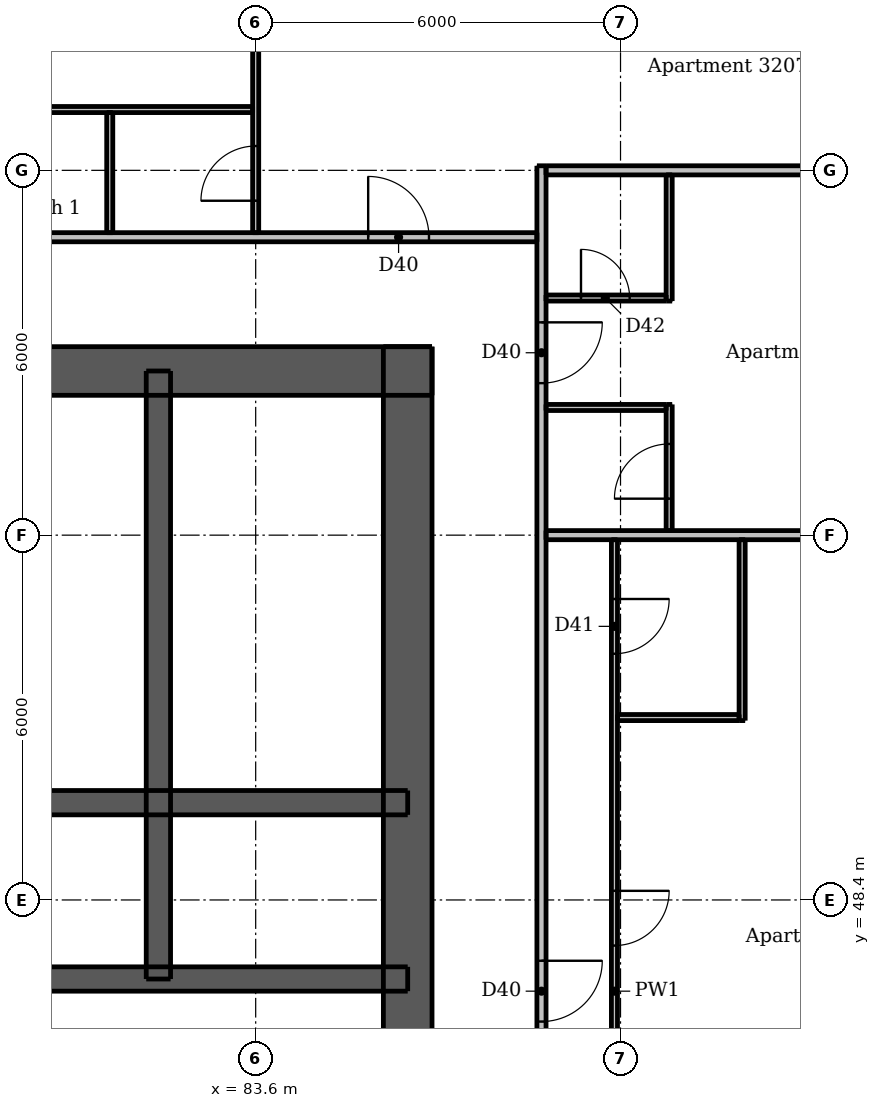
"""IFC4 building model, lengths in metres.
Left out: names, types, materials, properties, quantities, classifications, styles, units other than length and angle.
Written with IfcOpenShell. Run it as: python <this file> out.ifc"""

import sys

from ifc_helpers import new_model, si_unit, direction, frame, frame_2d, origin, place, context, subcontext, project, spatial, rectangle, extrude, element, fill, save


model = new_model("IFC4")
c1 = context("Model", 3, precision=1e-05, world=origin(), true_north=direction((0.0, 1.0)))
c2 = subcontext(c1, "Body", "Model", "MODEL_VIEW")
j1 = project(units=[si_unit("LENGTHUNIT", "METRE"), si_unit("PLANEANGLEUNIT", "RADIAN")], contexts=[c1])
p1 = place(None, origin())
s1 = spatial("IfcSite", under=j1, at=p1, CompositionType="ELEMENT")
p2 = place(p1, origin())
s2 = spatial("IfcBuilding", under=s1, at=p2, CompositionType="ELEMENT")
p3 = place(p2, frame((0.0, 0.0, 118.3)))
s3 = spatial("IfcBuildingStorey", under=s2, at=p3, CompositionType="ELEMENT", Elevation=118.3)
p4 = place(p3, frame((62.5, 57.1, 0.0), z_axis=(0.0, 0.0, 1.0), x_axis=(1.0, 0.0, 0.0)))
e1 = element("IfcWall", 1, at=p4, inside=s3, PredefinedType="SHEAR", context=c2, shape_type="SweptSolid", body=[
    extrude(rectangle(XDim=24.0, YDim=0.8, at=frame_2d((12.0, 0.0))), origin(), (0.0, 0.0, 1.0), 3.05),
])
p5 = place(p4, frame((20.9, 0.0, 0.0)))
e2 = element("IfcOpeningElement", 2, at=p5, cuts=e1, PredefinedType="OPENING", context=c2, shape_type="SweptSolid", body=[
    extrude(rectangle(XDim=1.1, YDim=2.1, at=frame_2d((0.55, 1.05))), frame((0.0, 0.41, 0.0), z_axis=(0.0, -1.0, 0.0), x_axis=(1.0, 0.0, 0.0)), (0.0, 0.0, 1.0), 0.82),
])
p6 = place(p4, frame((2.0, 0.0, 0.0)))
e3 = element("IfcOpeningElement", 3, at=p6, cuts=e1, PredefinedType="OPENING", context=c2, shape_type="SweptSolid", body=[
    extrude(rectangle(XDim=1.1, YDim=2.1, at=frame_2d((0.55, 1.05))), frame((0.0, 0.41, 0.0), z_axis=(0.0, -1.0, 0.0), x_axis=(1.0, 0.0, 0.0)), (0.0, 0.0, 1.0), 0.82),
])
p7 = place(p4, frame((6.075, 0.0, 0.0)))
e4 = element("IfcOpeningElement", 4, at=p7, cuts=e1, PredefinedType="OPENING", context=c2, shape_type="SweptSolid", body=[
    extrude(rectangle(XDim=0.9, YDim=2.1, at=frame_2d((0.45, 1.05))), frame((0.0, 0.41, 0.0), z_axis=(0.0, -1.0, 0.0), x_axis=(1.0, 0.0, 0.0)), (0.0, 0.0, 1.0), 0.82),
])
p8 = place(p4, frame((10.455, 0.0, 0.0)))
e5 = element("IfcOpeningElement", 5, at=p8, cuts=e1, PredefinedType="OPENING", context=c2, shape_type="SweptSolid", body=[
    extrude(rectangle(XDim=0.9, YDim=2.1, at=frame_2d((0.45, 1.05))), frame((0.0, 0.41, 0.0), z_axis=(0.0, -1.0, 0.0), x_axis=(1.0, 0.0, 0.0)), (0.0, 0.0, 1.0), 0.82),
])
p9 = place(p4, frame((15.93, 0.0, 0.0)))
e6 = element("IfcOpeningElement", 6, at=p9, cuts=e1, PredefinedType="OPENING", context=c2, shape_type="SweptSolid", body=[
    extrude(rectangle(XDim=0.9, YDim=2.1, at=frame_2d((0.45, 1.05))), frame((0.0, 0.41, 0.0), z_axis=(0.0, -1.0, 0.0), x_axis=(1.0, 0.0, 0.0)), (0.0, 0.0, 1.0), 0.82),
])
p10 = place(p3, frame((86.1, 33.5, 0.0), z_axis=(0.0, 0.0, 1.0), x_axis=(0.0, 1.0, 0.0)))
e7 = element("IfcWall", 7, at=p10, inside=s3, PredefinedType="SHEAR", context=c2, shape_type="SweptSolid", body=[
    extrude(rectangle(XDim=24.0, YDim=0.8, at=frame_2d((12.0, 0.0))), origin(), (0.0, 0.0, 1.0), 3.05),
])
p11 = place(p10, frame((11.2, 0.0, 0.0)))
e8 = element("IfcOpeningElement", 8, at=p11, cuts=e7, PredefinedType="OPENING", context=c2, shape_type="SweptSolid", body=[
    extrude(rectangle(XDim=1.6, YDim=2.1, at=frame_2d((0.8, 1.05))), frame((0.0, 0.41, 0.0), z_axis=(0.0, -1.0, 0.0), x_axis=(1.0, 0.0, 0.0)), (0.0, 0.0, 1.0), 0.82),
])
p12 = place(p3, frame((62.9, 47.1, 0.0), z_axis=(0.0, 0.0, 1.0), x_axis=(1.0, 0.0, 0.0)))
e9 = element("IfcWall", 9, at=p12, inside=s3, PredefinedType="SHEAR", context=c2, shape_type="SweptSolid", body=[
    extrude(rectangle(XDim=23.2, YDim=0.4, at=frame_2d((11.6, 0.0))), origin(), (0.0, 0.0, 1.0), 3.05),
])
p13 = place(p12, frame((0.825, 0.0, 0.0)))
e10 = element("IfcOpeningElement", 10, at=p13, cuts=e9, PredefinedType="OPENING", context=c2, shape_type="SweptSolid", body=[
    extrude(rectangle(XDim=0.9, YDim=2.1, at=frame_2d((0.45, 1.05))), frame((0.0, 0.21, 0.0), z_axis=(0.0, -1.0, 0.0), x_axis=(1.0, 0.0, 0.0)), (0.0, 0.0, 1.0), 0.42),
])
p14 = place(p12, frame((2.575, 0.0, 0.0)))
e11 = element("IfcOpeningElement", 11, at=p14, cuts=e9, PredefinedType="OPENING", context=c2, shape_type="SweptSolid", body=[
    extrude(rectangle(XDim=0.9, YDim=2.1, at=frame_2d((0.45, 1.05))), frame((0.0, 0.21, 0.0), z_axis=(0.0, -1.0, 0.0), x_axis=(1.0, 0.0, 0.0)), (0.0, 0.0, 1.0), 0.42),
])
p15 = place(p12, frame((20.6, 0.0, 0.0)))
e12 = element("IfcOpeningElement", 12, at=p15, cuts=e9, PredefinedType="OPENING", context=c2, shape_type="SweptSolid", body=[
    extrude(rectangle(XDim=0.9, YDim=2.1, at=frame_2d((0.45, 1.05))), frame((0.0, 0.21, 0.0), z_axis=(0.0, -1.0, 0.0), x_axis=(1.0, 0.0, 0.0)), (0.0, 0.0, 1.0), 0.42),
])
p16 = place(p3, frame((62.9, 50.0, 0.0), z_axis=(0.0, 0.0, 1.0), x_axis=(1.0, 0.0, 0.0)))
e13 = element("IfcWall", 13, at=p16, inside=s3, PredefinedType="SHEAR", context=c2, shape_type="SweptSolid", body=[
    extrude(rectangle(XDim=23.2, YDim=0.4, at=frame_2d((11.6, 0.0))), origin(), (0.0, 0.0, 1.0), 3.05),
])
p17 = place(p3, frame((82.0, 47.1, 0.0), z_axis=(0.0, 0.0, 1.0), x_axis=(0.0, 1.0, 0.0)))
e14 = element("IfcWall", 14, at=p17, inside=s3, PredefinedType="SHEAR", context=c2, shape_type="SweptSolid", body=[
    extrude(rectangle(XDim=10.0, YDim=0.4, at=frame_2d((5.0, 0.0))), origin(), (0.0, 0.0, 1.0), 3.05),
])
p18 = place(p3, frame((81.2, 59.375, 0.0), z_axis=(0.0, 0.0, 1.0), x_axis=(0.0, 1.0, 0.0)))
e15 = element("IfcWall", 15, at=p18, inside=s3, PredefinedType="PARTITIONING", context=c2, shape_type="SweptSolid", body=[
    extrude(rectangle(XDim=1.975, YDim=0.1, at=frame_2d((0.988, 0.0))), origin(), (0.0, 0.0, 1.0), 3.05),
])
p19 = place(p3, frame((83.6, 59.375, 0.0), z_axis=(0.0, 0.0, 1.0), x_axis=(0.0, 1.0, 0.0)))
e16 = element("IfcWall", 16, at=p19, inside=s3, PredefinedType="PARTITIONING", context=c2, shape_type="SweptSolid", body=[
    extrude(rectangle(XDim=8.625, YDim=0.1, at=frame_2d((4.312, 0.0))), origin(), (0.0, 0.0, 1.0), 2.516),
])
p20 = place(p19, frame((0.525, 0.0, 0.0)))
e17 = element("IfcOpeningElement", 17, at=p20, cuts=e16, PredefinedType="OPENING", context=c2, shape_type="SweptSolid", body=[
    extrude(rectangle(XDim=0.9, YDim=2.1, at=frame_2d((0.45, 1.05))), frame((0.0, 0.06, 0.0), z_axis=(0.0, -1.0, 0.0), x_axis=(1.0, 0.0, 0.0)), (0.0, 0.0, 1.0), 0.12),
])
p21 = place(p19, frame((4.875, 0.0, 0.0)))
e18 = element("IfcOpeningElement", 18, at=p21, cuts=e16, PredefinedType="OPENING", context=c2, shape_type="SweptSolid", body=[
    extrude(rectangle(XDim=0.9, YDim=2.1, at=frame_2d((0.45, 1.05))), frame((0.0, 0.06, 0.0), z_axis=(0.0, -1.0, 0.0), x_axis=(1.0, 0.0, 0.0)), (0.0, 0.0, 1.0), 0.12),
])
p22 = place(p3, frame((89.5, 54.325, 0.0), z_axis=(0.0, 0.0, 1.0), x_axis=(0.0, -1.0, 0.0)))
e19 = element("IfcWall", 19, at=p22, inside=s3, PredefinedType="PARTITIONING", context=c2, shape_type="SweptSolid", body=[
    extrude(rectangle(XDim=14.85, YDim=0.1, at=frame_2d((7.425, 0.0))), origin(), (0.0, 0.0, 1.0), 3.05),
])
p23 = place(p22, frame((5.775, 0.0, 0.0)))
e20 = element("IfcOpeningElement", 20, at=p23, cuts=e19, PredefinedType="OPENING", context=c2, shape_type="SweptSolid", body=[
    extrude(rectangle(XDim=0.9, YDim=2.1, at=frame_2d((0.45, 1.05))), frame((0.0, 0.06, 0.0), z_axis=(0.0, -1.0, 0.0), x_axis=(1.0, 0.0, 0.0)), (0.0, 0.0, 1.0), 0.12),
])
p24 = place(p22, frame((0.975, 0.0, 0.0)))
e21 = element("IfcOpeningElement", 21, at=p24, cuts=e19, PredefinedType="OPENING", context=c2, shape_type="SweptSolid", body=[
    extrude(rectangle(XDim=0.9, YDim=2.1, at=frame_2d((0.45, 1.05))), frame((0.0, 0.06, 0.0), z_axis=(0.0, -1.0, 0.0), x_axis=(1.0, 0.0, 0.0)), (0.0, 0.0, 1.0), 0.12),
])
p25 = place(p22, frame((12.975, 0.0, 0.0)))
e22 = element("IfcOpeningElement", 22, at=p25, cuts=e19, PredefinedType="OPENING", context=c2, shape_type="SweptSolid", body=[
    extrude(rectangle(XDim=0.9, YDim=2.1, at=frame_2d((0.45, 1.05))), frame((0.0, 0.06, 0.0), z_axis=(0.0, -1.0, 0.0), x_axis=(1.0, 0.0, 0.0)), (0.0, 0.0, 1.0), 0.12),
])
p26 = place(p22, frame((10.325, 0.0, 0.0)))
e23 = element("IfcOpeningElement", 23, at=p26, cuts=e19, PredefinedType="OPENING", context=c2, shape_type="SweptSolid", body=[
    extrude(rectangle(XDim=0.8, YDim=2.1, at=frame_2d((0.4, 1.05))), frame((0.0, 0.06, 0.0), z_axis=(0.0, -1.0, 0.0), x_axis=(1.0, 0.0, 0.0)), (0.0, 0.0, 1.0), 0.12),
])
p27 = place(p3, frame((90.4, 54.475, 0.0), z_axis=(0.0, 0.0, 1.0), x_axis=(0.0, 1.0, 0.0)))
e24 = element("IfcWall", 24, at=p27, inside=s3, PredefinedType="PARTITIONING", context=c2, shape_type="SweptSolid", body=[
    extrude(rectangle(XDim=2.075, YDim=0.1, at=frame_2d((1.038, 0.0))), origin(), (0.0, 0.0, 1.0), 3.05),
])
p28 = place(p27, frame((0.525, 0.0, 0.0)))
e25 = element("IfcOpeningElement", 25, at=p28, cuts=e24, PredefinedType="OPENING", context=c2, shape_type="SweptSolid", body=[
    extrude(rectangle(XDim=0.9, YDim=2.1, at=frame_2d((0.45, 1.05))), frame((0.0, 0.06, 0.0), z_axis=(0.0, -1.0, 0.0), x_axis=(1.0, 0.0, 0.0)), (0.0, 0.0, 1.0), 0.12),
])
p29 = place(p3, frame((90.4, 58.25, 0.0), z_axis=(0.0, 0.0, 1.0), x_axis=(0.0, 1.0, 0.0)))
e26 = element("IfcWall", 26, at=p29, inside=s3, PredefinedType="PARTITIONING", context=c2, shape_type="SweptSolid", body=[
    extrude(rectangle(XDim=2.075, YDim=0.1, at=frame_2d((1.038, 0.0))), origin(), (0.0, 0.0, 1.0), 3.05),
])
p30 = place(p3, frame((91.6, 51.35, 0.0), z_axis=(0.0, 0.0, 1.0), x_axis=(0.0, 1.0, 0.0)))
e27 = element("IfcWall", 27, at=p30, inside=s3, PredefinedType="PARTITIONING", context=c2, shape_type="SweptSolid", body=[
    extrude(rectangle(XDim=2.975, YDim=0.1, at=frame_2d((1.487, 0.0))), origin(), (0.0, 0.0, 1.0), 3.05),
])
p31 = place(p3, frame((83.55, 61.4, 0.0), z_axis=(0.0, 0.0, 1.0), x_axis=(-1.0, 0.0, 0.0)))
e28 = element("IfcWall", 28, at=p31, inside=s3, PredefinedType="PARTITIONING", context=c2, shape_type="SweptSolid", body=[
    extrude(rectangle(XDim=5.875, YDim=0.1, at=frame_2d((2.938, 0.0))), origin(), (0.0, 0.0, 1.0), 3.05),
])
p32 = place(p31, frame((3.75, 0.0, 0.0)))
e29 = element("IfcOpeningElement", 29, at=p32, cuts=e28, PredefinedType="OPENING", context=c2, shape_type="SweptSolid", body=[
    extrude(rectangle(XDim=0.8, YDim=2.1, at=frame_2d((0.4, 1.05))), frame((0.0, 0.06, 0.0), z_axis=(0.0, -1.0, 0.0), x_axis=(1.0, 0.0, 0.0)), (0.0, 0.0, 1.0), 0.12),
])
p33 = place(p3, frame((88.375, 58.3, 0.0), z_axis=(0.0, 0.0, 1.0), x_axis=(1.0, 0.0, 0.0)))
e30 = element("IfcWall", 30, at=p33, inside=s3, PredefinedType="PARTITIONING", context=c2, shape_type="SweptSolid", body=[
    extrude(rectangle(XDim=1.975, YDim=0.1, at=frame_2d((0.988, 0.0))), origin(), (0.0, 0.0, 1.0), 3.05),
])
p34 = place(p33, frame((0.575, 0.0, 0.0)))
e31 = element("IfcOpeningElement", 31, at=p34, cuts=e30, PredefinedType="OPENING", context=c2, shape_type="SweptSolid", body=[
    extrude(rectangle(XDim=0.8, YDim=2.1, at=frame_2d((0.4, 1.05))), frame((0.0, 0.06, 0.0), z_axis=(0.0, -1.0, 0.0), x_axis=(1.0, 0.0, 0.0)), (0.0, 0.0, 1.0), 0.12),
])
p35 = place(p3, frame((88.375, 56.5, 0.0), z_axis=(0.0, 0.0, 1.0), x_axis=(1.0, 0.0, 0.0)))
e32 = element("IfcWall", 32, at=p35, inside=s3, PredefinedType="PARTITIONING", context=c2, shape_type="SweptSolid", body=[
    extrude(rectangle(XDim=1.975, YDim=0.1, at=frame_2d((0.988, 0.0))), origin(), (0.0, 0.0, 1.0), 3.05),
])
p36 = place(p3, frame((89.55, 51.4, 0.0), z_axis=(0.0, 0.0, 1.0), x_axis=(1.0, 0.0, 0.0)))
e33 = element("IfcWall", 33, at=p36, inside=s3, PredefinedType="PARTITIONING", context=c2, shape_type="SweptSolid", body=[
    extrude(rectangle(XDim=2.0, YDim=0.1, at=frame_2d((1.0, 0.0))), origin(), (0.0, 0.0, 1.0), 3.05),
])
p37 = place(p3, frame((88.3, 60.475, 0.0), z_axis=(0.0, 0.0, 1.0), x_axis=(0.0, -1.0, 0.0)))
e34 = element("IfcWall", 34, at=p37, inside=s3, PredefinedType="PARTITIONING", context=c2, shape_type="SweptSolid", body=[
    extrude(rectangle(XDim=28.7, YDim=0.15, at=frame_2d((14.35, 0.0))), origin(), (0.0, 0.0, 1.0), 3.05),
])
p38 = place(p37, frame((27.425, 0.0, 0.0)))
e35 = element("IfcOpeningElement", 35, at=p38, cuts=e34, PredefinedType="OPENING", context=c2, shape_type="SweptSolid", body=[
    extrude(rectangle(XDim=1.0, YDim=2.1, at=frame_2d((0.5, 1.05))), frame((0.0, 0.085, 0.0), z_axis=(0.0, -1.0, 0.0), x_axis=(1.0, 0.0, 0.0)), (0.0, 0.0, 1.0), 0.17),
])
p39 = place(p37, frame((13.075, 0.0, 0.0)))
e36 = element("IfcOpeningElement", 36, at=p39, cuts=e34, PredefinedType="OPENING", context=c2, shape_type="SweptSolid", body=[
    extrude(rectangle(XDim=1.0, YDim=2.1, at=frame_2d((0.5, 1.05))), frame((0.0, 0.085, 0.0), z_axis=(0.0, -1.0, 0.0), x_axis=(1.0, 0.0, 0.0)), (0.0, 0.0, 1.0), 0.17),
])
p40 = place(p37, frame((2.575, 0.0, 0.0)))
e37 = element("IfcOpeningElement", 37, at=p40, cuts=e34, PredefinedType="OPENING", context=c2, shape_type="SweptSolid", body=[
    extrude(rectangle(XDim=1.0, YDim=2.1, at=frame_2d((0.5, 1.05))), frame((0.0, 0.085, 0.0), z_axis=(0.0, -1.0, 0.0), x_axis=(1.0, 0.0, 0.0)), (0.0, 0.0, 1.0), 0.17),
])
p41 = place(p3, frame((88.375, 60.4, 0.0), z_axis=(0.0, 0.0, 1.0), x_axis=(1.0, 0.0, 0.0)))
e38 = element("IfcWall", 38, at=p41, inside=s3, PredefinedType="PARTITIONING", context=c2, shape_type="SweptSolid", body=[
    extrude(rectangle(XDim=11.625, YDim=0.15, at=frame_2d((5.812, 0.0))), origin(), (0.0, 0.0, 1.0), 2.516),
])
p42 = place(p3, frame((59.675, 59.3, 0.0), z_axis=(0.0, 0.0, 1.0), x_axis=(1.0, 0.0, 0.0)))
e39 = element("IfcWall", 39, at=p42, inside=s3, PredefinedType="PARTITIONING", context=c2, shape_type="SweptSolid", body=[
    extrude(rectangle(XDim=28.55, YDim=0.15, at=frame_2d((14.275, 0.0))), origin(), (0.0, 0.0, 1.0), 3.05),
])
p43 = place(p42, frame((8.975, 0.0, 0.0)))
e40 = element("IfcOpeningElement", 40, at=p43, cuts=e39, PredefinedType="OPENING", context=c2, shape_type="SweptSolid", body=[
    extrude(rectangle(XDim=1.0, YDim=2.1, at=frame_2d((0.5, 1.05))), frame((0.0, 0.085, 0.0), z_axis=(0.0, -1.0, 0.0), x_axis=(1.0, 0.0, 0.0)), (0.0, 0.0, 1.0), 0.17),
])
p44 = place(p42, frame((25.775, 0.0, 0.0)))
e41 = element("IfcOpeningElement", 41, at=p44, cuts=e39, PredefinedType="OPENING", context=c2, shape_type="SweptSolid", body=[
    extrude(rectangle(XDim=1.0, YDim=2.1, at=frame_2d((0.5, 1.05))), frame((0.0, 0.085, 0.0), z_axis=(0.0, -1.0, 0.0), x_axis=(1.0, 0.0, 0.0)), (0.0, 0.0, 1.0), 0.17),
])
p45 = place(p3, frame((88.375, 54.4, 0.0), z_axis=(0.0, 0.0, 1.0), x_axis=(1.0, 0.0, 0.0)))
e42 = element("IfcWall", 42, at=p45, inside=s3, PredefinedType="PARTITIONING", context=c2, shape_type="SweptSolid", body=[
    extrude(rectangle(XDim=10.125, YDim=0.15, at=frame_2d((5.062, 0.0))), origin(), (0.0, 0.0, 1.0), 2.516),
])
p46 = place(p5, origin())
e43 = element("IfcDoor", 43, at=p46, inside=s3, OperationType="SINGLE_SWING_RIGHT", PredefinedType="DOOR", context=c2, shape_type="SweptSolid", body=[
    extrude(rectangle(XDim=1.1, YDim=2.1, at=frame_2d((0.55, 1.05))), frame((0.0, -0.337, 0.0), z_axis=(0.0, -1.0, 0.0), x_axis=(1.0, 0.0, 0.0)), (0.0, 0.0, 1.0), 0.05),
])
fill(e2, e43)
p47 = place(p15, origin())
e44 = element("IfcDoor", 44, at=p47, inside=s3, OperationType="SINGLE_SWING_LEFT", PredefinedType="DOOR", context=c2, shape_type="SweptSolid", body=[
    extrude(rectangle(XDim=0.9, YDim=2.1, at=frame_2d((0.45, 1.05))), frame((0.0, 0.188, 0.0), z_axis=(0.0, -1.0, 0.0), x_axis=(1.0, 0.0, 0.0)), (0.0, 0.0, 1.0), 0.05),
])
fill(e12, e44)
p48 = place(p39, origin())
e45 = element("IfcDoor", 45, at=p48, inside=s3, OperationType="SINGLE_SWING_LEFT", PredefinedType="DOOR", context=c2, shape_type="SweptSolid", body=[
    extrude(rectangle(XDim=1.0, YDim=2.1, at=frame_2d((0.5, 1.05))), frame((0.0, 0.025, 0.0), z_axis=(0.0, -1.0, 0.0), x_axis=(1.0, 0.0, 0.0)), (0.0, 0.0, 1.0), 0.05),
])
fill(e36, e45)
p49 = place(p23, origin())
e46 = element("IfcDoor", 46, at=p49, inside=s3, OperationType="SINGLE_SWING_LEFT", PredefinedType="DOOR", context=c2, shape_type="SweptSolid", body=[
    extrude(rectangle(XDim=0.9, YDim=2.1, at=frame_2d((0.45, 1.05))), frame((0.0, 0.025, 0.0), z_axis=(0.0, -1.0, 0.0), x_axis=(1.0, 0.0, 0.0)), (0.0, 0.0, 1.0), 0.05),
])
fill(e20, e46)
p50 = place(p24, origin())
e47 = element("IfcDoor", 47, at=p50, inside=s3, OperationType="SINGLE_SWING_LEFT", PredefinedType="DOOR", context=c2, shape_type="SweptSolid", body=[
    extrude(rectangle(XDim=0.9, YDim=2.1, at=frame_2d((0.45, 1.05))), frame((0.0, 0.025, 0.0), z_axis=(0.0, -1.0, 0.0), x_axis=(1.0, 0.0, 0.0)), (0.0, 0.0, 1.0), 0.05),
])
fill(e21, e47)
p51 = place(p40, origin())
e48 = element("IfcDoor", 48, at=p51, inside=s3, OperationType="SINGLE_SWING_LEFT", PredefinedType="DOOR", context=c2, shape_type="SweptSolid", body=[
    extrude(rectangle(XDim=1.0, YDim=2.1, at=frame_2d((0.5, 1.05))), frame((0.0, 0.025, 0.0), z_axis=(0.0, -1.0, 0.0), x_axis=(1.0, 0.0, 0.0)), (0.0, 0.0, 1.0), 0.05),
])
fill(e37, e48)
p52 = place(p28, origin())
e49 = element("IfcDoor", 49, at=p52, inside=s3, OperationType="SINGLE_SWING_LEFT", PredefinedType="DOOR", context=c2, shape_type="SweptSolid", body=[
    extrude(rectangle(XDim=0.9, YDim=2.1, at=frame_2d((0.45, 1.05))), frame((0.0, 0.025, 0.0), z_axis=(0.0, -1.0, 0.0), x_axis=(1.0, 0.0, 0.0)), (0.0, 0.0, 1.0), 0.05),
])
fill(e25, e49)
p53 = place(p34, origin())
e50 = element("IfcDoor", 50, at=p53, inside=s3, OperationType="SINGLE_SWING_LEFT", PredefinedType="DOOR", context=c2, shape_type="SweptSolid", body=[
    extrude(rectangle(XDim=0.8, YDim=2.1, at=frame_2d((0.4, 1.05))), frame((0.0, 0.025, 0.0), z_axis=(0.0, -1.0, 0.0), x_axis=(1.0, 0.0, 0.0)), (0.0, 0.0, 1.0), 0.05),
])
fill(e31, e50)
p54 = place(p44, origin())
e51 = element("IfcDoor", 51, at=p54, inside=s3, OperationType="SINGLE_SWING_LEFT", PredefinedType="DOOR", context=c2, shape_type="SweptSolid", body=[
    extrude(rectangle(XDim=1.0, YDim=2.1, at=frame_2d((0.5, 1.05))), frame((0.0, 0.025, 0.0), z_axis=(0.0, -1.0, 0.0), x_axis=(1.0, 0.0, 0.0)), (0.0, 0.0, 1.0), 0.05),
])
fill(e41, e51)
p55 = place(p20, origin())
e52 = element("IfcDoor", 52, at=p55, inside=s3, OperationType="SINGLE_SWING_LEFT", PredefinedType="DOOR", context=c2, shape_type="SweptSolid", body=[
    extrude(rectangle(XDim=0.9, YDim=2.1, at=frame_2d((0.45, 1.05))), frame((0.0, 0.025, 0.0), z_axis=(0.0, -1.0, 0.0), x_axis=(1.0, 0.0, 0.0)), (0.0, 0.0, 1.0), 0.05),
])
fill(e17, e52)
save(model, sys.argv[1])
